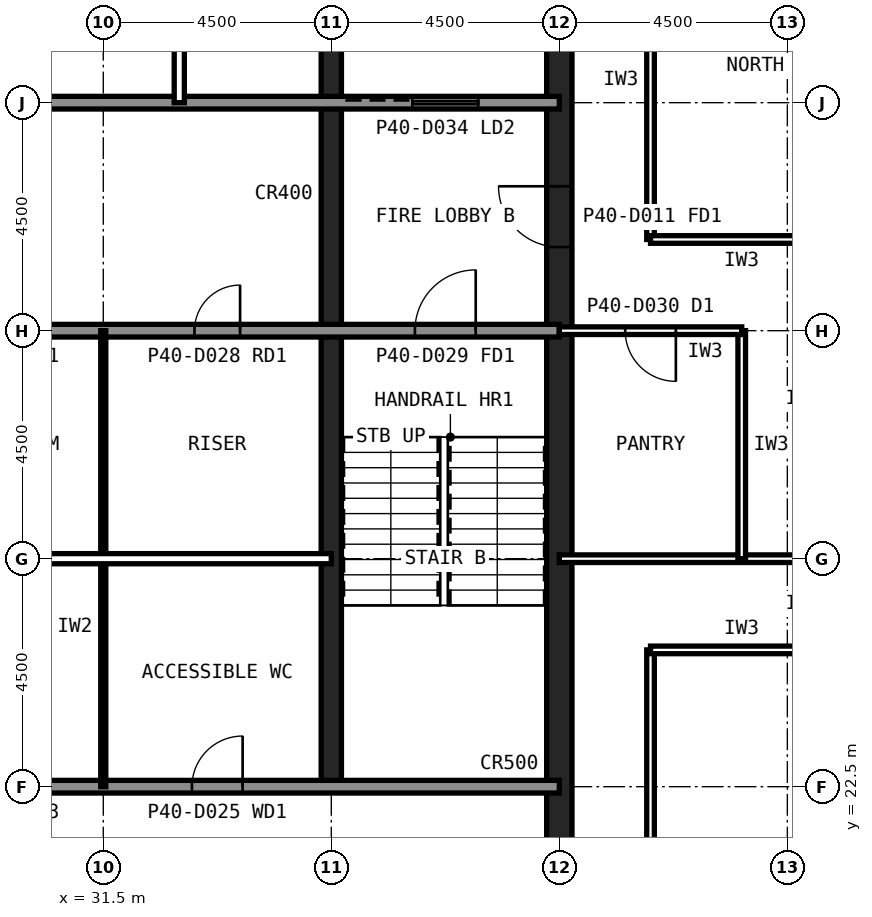
"""IFC4 building model, lengths in metres.
Left out: names, types, materials, properties, quantities, classifications, styles, units other than length and angle.
Written with IfcOpenShell. Run it as: python <this file> out.ifc"""

import sys

from ifc_helpers import new_model, si_unit, direction, frame, frame_2d, origin, place, context, subcontext, project, spatial, rectangle, extrude, element, fill, save


model = new_model("IFC4")
c1 = context("Model", 3, precision=1e-05, world=origin(), true_north=direction((0.0, 1.0)))
c2 = subcontext(c1, "Body", "Model", "MODEL_VIEW")
j1 = project(units=[si_unit("LENGTHUNIT", "METRE"), si_unit("PLANEANGLEUNIT", "RADIAN")], contexts=[c1])
p1 = place(None, origin())
s1 = spatial("IfcSite", under=j1, at=p1, CompositionType="ELEMENT")
p2 = place(p1, origin())
s2 = spatial("IfcBuilding", under=s1, at=p2, CompositionType="ELEMENT")
p3 = place(p2, frame((0.0, 0.0, 167.6)))
s3 = spatial("IfcBuildingStorey", under=s2, at=p3, CompositionType="ELEMENT", Elevation=167.6)
p4 = place(p3, frame((40.5, 13.5, 0.0), z_axis=(0.0, 0.0, 1.0), x_axis=(0.0, 1.0, 0.0)))
e1 = element("IfcWall", 1, at=p4, inside=s3, PredefinedType="SHEAR", context=c2, shape_type="SweptSolid", body=[
    extrude(rectangle(XDim=27.0, YDim=0.5, at=frame_2d((13.5, 0.0))), origin(), (0.0, 0.0, 1.0), 4.0),
])
p5 = place(p4, frame((5.85, 0.0, 0.0)))
e2 = element("IfcOpeningElement", 2, at=p5, cuts=e1, PredefinedType="OPENING", context=c2, shape_type="SweptSolid", body=[
    extrude(rectangle(XDim=1.8, YDim=2.1, at=frame_2d((0.9, 1.05))), frame((0.0, 0.26, 0.0), z_axis=(0.0, -1.0, 0.0), x_axis=(1.0, 0.0, 0.0)), (0.0, 0.0, 1.0), 0.52),
])
p6 = place(p4, frame((19.65, 0.0, 0.0)))
e3 = element("IfcOpeningElement", 3, at=p6, cuts=e1, PredefinedType="OPENING", context=c2, shape_type="SweptSolid", body=[
    extrude(rectangle(XDim=1.2, YDim=2.1, at=frame_2d((0.6, 1.05))), frame((0.0, 0.26, 0.0), z_axis=(0.0, -1.0, 0.0), x_axis=(1.0, 0.0, 0.0)), (0.0, 0.0, 1.0), 0.52),
])
p7 = place(p3, frame((36.0, 22.5, 0.0), z_axis=(0.0, 0.0, 1.0), x_axis=(0.0, 1.0, 0.0)))
e4 = element("IfcWall", 4, at=p7, inside=s3, PredefinedType="SHEAR", context=c2, shape_type="SweptSolid", body=[
    extrude(rectangle(XDim=18.0, YDim=0.4, at=frame_2d((9.0, 0.0))), origin(), (0.0, 0.0, 1.0), 4.0),
])
p8 = place(p3, frame((13.5, 36.0, 0.0), z_axis=(0.0, 0.0, 1.0), x_axis=(1.0, 0.0, 0.0)))
e5 = element("IfcWall", 5, at=p8, inside=s3, PredefinedType="SOLIDWALL", context=c2, shape_type="SweptSolid", body=[
    extrude(rectangle(XDim=27.0, YDim=0.25, at=frame_2d((13.5, 0.0))), origin(), (0.0, 0.0, 1.0), 3.84),
])
p9 = place(p8, frame((1.8, 0.0, 0.0)))
e6 = element("IfcOpeningElement", 6, at=p9, cuts=e5, PredefinedType="OPENING", context=c2, shape_type="SweptSolid", body=[
    extrude(rectangle(XDim=0.9, YDim=2.1, at=frame_2d((0.45, 1.05))), frame((0.0, 0.135, 0.0), z_axis=(0.0, -1.0, 0.0), x_axis=(1.0, 0.0, 0.0)), (0.0, 0.0, 1.0), 0.27),
])
p10 = place(p8, frame((5.55, 0.0, 0.0)))
e7 = element("IfcOpeningElement", 7, at=p10, cuts=e5, PredefinedType="OPENING", context=c2, shape_type="SweptSolid", body=[
    extrude(rectangle(XDim=0.9, YDim=2.1, at=frame_2d((0.45, 1.05))), frame((0.0, 0.135, 0.0), z_axis=(0.0, -1.0, 0.0), x_axis=(1.0, 0.0, 0.0)), (0.0, 0.0, 1.0), 0.27),
])
p11 = place(p8, frame((8.55, 0.0, 0.0)))
e8 = element("IfcOpeningElement", 8, at=p11, cuts=e5, PredefinedType="OPENING", context=c2, shape_type="SweptSolid", body=[
    extrude(rectangle(XDim=0.9, YDim=2.1, at=frame_2d((0.45, 1.05))), frame((0.0, 0.135, 0.0), z_axis=(0.0, -1.0, 0.0), x_axis=(1.0, 0.0, 0.0)), (0.0, 0.0, 1.0), 0.27),
])
p12 = place(p8, frame((24.1, 0.0, 0.0)))
e9 = element("IfcOpeningElement", 9, at=p12, cuts=e5, PredefinedType="OPENING", context=c2, shape_type="SweptSolid", body=[
    extrude(rectangle(XDim=1.3, YDim=2.2, at=frame_2d((0.65, 1.1))), frame((0.0, 0.135, 0.0), z_axis=(0.0, -1.0, 0.0), x_axis=(1.0, 0.0, 0.0)), (0.0, 0.0, 1.0), 0.27),
])
p13 = place(p3, frame((13.5, 22.5, 0.0), z_axis=(0.0, 0.0, 1.0), x_axis=(1.0, 0.0, 0.0)))
e10 = element("IfcWall", 10, at=p13, inside=s3, PredefinedType="SOLIDWALL", context=c2, shape_type="SweptSolid", body=[
    extrude(rectangle(XDim=27.0, YDim=0.25, at=frame_2d((13.5, 0.0))), origin(), (0.0, 0.0, 1.0), 3.84),
])
p14 = place(p13, frame((1.65, 0.0, 0.0)))
e11 = element("IfcOpeningElement", 11, at=p14, cuts=e10, PredefinedType="OPENING", context=c2, shape_type="SweptSolid", body=[
    extrude(rectangle(XDim=1.2, YDim=2.1, at=frame_2d((0.6, 1.05))), frame((0.0, 0.135, 0.0), z_axis=(0.0, -1.0, 0.0), x_axis=(1.0, 0.0, 0.0)), (0.0, 0.0, 1.0), 0.27),
])
p15 = place(p13, frame((6.025, 0.0, 0.0)))
e12 = element("IfcOpeningElement", 12, at=p15, cuts=e10, PredefinedType="OPENING", context=c2, shape_type="SweptSolid", body=[
    extrude(rectangle(XDim=1.0, YDim=2.1, at=frame_2d((0.5, 1.05))), frame((0.0, 0.135, 0.0), z_axis=(0.0, -1.0, 0.0), x_axis=(1.0, 0.0, 0.0)), (0.0, 0.0, 1.0), 0.27),
])
p16 = place(p13, frame((10.525, 0.0, 0.0)))
e13 = element("IfcOpeningElement", 13, at=p16, cuts=e10, PredefinedType="OPENING", context=c2, shape_type="SweptSolid", body=[
    extrude(rectangle(XDim=1.0, YDim=2.1, at=frame_2d((0.5, 1.05))), frame((0.0, 0.135, 0.0), z_axis=(0.0, -1.0, 0.0), x_axis=(1.0, 0.0, 0.0)), (0.0, 0.0, 1.0), 0.27),
])
p17 = place(p13, frame((19.75, 0.0, 0.0)))
e14 = element("IfcOpeningElement", 14, at=p17, cuts=e10, PredefinedType="OPENING", context=c2, shape_type="SweptSolid", body=[
    extrude(rectangle(XDim=1.0, YDim=2.1, at=frame_2d((0.5, 1.05))), frame((0.0, 0.135, 0.0), z_axis=(0.0, -1.0, 0.0), x_axis=(1.0, 0.0, 0.0)), (0.0, 0.0, 1.0), 0.27),
])
p18 = place(p13, frame((15.05, 0.0, 0.0)))
e15 = element("IfcOpeningElement", 15, at=p18, cuts=e10, PredefinedType="OPENING", context=c2, shape_type="SweptSolid", body=[
    extrude(rectangle(XDim=1.4, YDim=2.4, at=frame_2d((0.7, 1.2))), frame((0.0, 0.135, 0.0), z_axis=(0.0, -1.0, 0.0), x_axis=(1.0, 0.0, 0.0)), (0.0, 0.0, 1.0), 0.27),
])
p19 = place(p3, frame((13.5, 31.5, 0.0), z_axis=(0.0, 0.0, 1.0), x_axis=(1.0, 0.0, 0.0)))
e16 = element("IfcWall", 16, at=p19, inside=s3, PredefinedType="SOLIDWALL", context=c2, shape_type="SweptSolid", body=[
    extrude(rectangle(XDim=27.0, YDim=0.25, at=frame_2d((13.5, 0.0))), origin(), (0.0, 0.0, 1.0), 3.84),
])
p20 = place(p19, frame((24.15, 0.0, 0.0)))
e17 = element("IfcOpeningElement", 17, at=p20, cuts=e16, PredefinedType="OPENING", context=c2, shape_type="SweptSolid", body=[
    extrude(rectangle(XDim=1.2, YDim=2.1, at=frame_2d((0.6, 1.05))), frame((0.0, 0.135, 0.0), z_axis=(0.0, -1.0, 0.0), x_axis=(1.0, 0.0, 0.0)), (0.0, 0.0, 1.0), 0.27),
])
p21 = place(p19, frame((15.3, 0.0, 0.0)))
e18 = element("IfcOpeningElement", 18, at=p21, cuts=e16, PredefinedType="OPENING", context=c2, shape_type="SweptSolid", body=[
    extrude(rectangle(XDim=0.9, YDim=2.1, at=frame_2d((0.45, 1.05))), frame((0.0, 0.135, 0.0), z_axis=(0.0, -1.0, 0.0), x_axis=(1.0, 0.0, 0.0)), (0.0, 0.0, 1.0), 0.27),
])
p22 = place(p19, frame((19.8, 0.0, 0.0)))
e19 = element("IfcOpeningElement", 19, at=p22, cuts=e16, PredefinedType="OPENING", context=c2, shape_type="SweptSolid", body=[
    extrude(rectangle(XDim=0.9, YDim=2.1, at=frame_2d((0.45, 1.05))), frame((0.0, 0.135, 0.0), z_axis=(0.0, -1.0, 0.0), x_axis=(1.0, 0.0, 0.0)), (0.0, 0.0, 1.0), 0.27),
])
p23 = place(p3, frame((33.0, 36.0, 0.0), z_axis=(0.0, 0.0, 1.0), x_axis=(0.0, 1.0, 0.0)))
e20 = element("IfcWall", 20, at=p23, inside=s3, PredefinedType="PARTITIONING", context=c2, shape_type="SweptSolid", body=[
    extrude(rectangle(XDim=4.5, YDim=0.2, at=frame_2d((2.25, 0.0))), origin(), (0.0, 0.0, 1.0), 3.84),
])
p24 = place(p3, frame((31.5, 22.5, 0.0), z_axis=(0.0, 0.0, 1.0), x_axis=(0.0, 1.0, 0.0)))
e21 = element("IfcWall", 21, at=p24, inside=s3, PredefinedType="PLUMBINGWALL", context=c2, shape_type="SweptSolid", body=[
    extrude(rectangle(XDim=9.0, YDim=0.1, at=frame_2d((4.5, 0.0))), origin(), (0.0, 0.0, 1.0), 3.84),
])
p25 = place(p3, frame((27.0, 27.0, 0.0), z_axis=(0.0, 0.0, 1.0), x_axis=(1.0, 0.0, 0.0)))
e22 = element("IfcWall", 22, at=p25, inside=s3, PredefinedType="PARTITIONING", context=c2, shape_type="SweptSolid", body=[
    extrude(rectangle(XDim=9.0, YDim=0.2, at=frame_2d((4.5, 0.0))), origin(), (0.0, 0.0, 1.0), 3.84),
])
p26 = place(p3, frame((40.5, 27.0, 0.0), z_axis=(0.0, 0.0, 1.0), x_axis=(1.0, 0.0, 0.0)))
e23 = element("IfcWall", 23, at=p26, inside=s3, PredefinedType="PARTITIONING", context=c2, shape_type="SweptSolid", body=[
    extrude(rectangle(XDim=13.14, YDim=0.15, at=frame_2d((6.57, 0.0))), origin(), (0.0, 0.0, 1.0), 2.989),
])
p27 = place(p3, frame((42.3, 33.3, 0.0), z_axis=(0.0, 0.0, 1.0), x_axis=(0.0, 1.0, 0.0)))
e24 = element("IfcWall", 24, at=p27, inside=s3, PredefinedType="PARTITIONING", context=c2, shape_type="SweptSolid", body=[
    extrude(rectangle(XDim=9.0, YDim=0.15, at=frame_2d((4.5, 0.0))), origin(), (0.0, 0.0, 1.0), 3.84),
])
p28 = place(p27, frame((4.0, 0.0, 0.0)))
e25 = element("IfcOpeningElement", 25, at=p28, cuts=e24, PredefinedType="OPENING", context=c2, shape_type="SweptSolid", body=[
    extrude(rectangle(XDim=1.0, YDim=2.1, at=frame_2d((0.5, 1.05))), frame((0.0, 0.085, 0.0), z_axis=(0.0, -1.0, 0.0), x_axis=(1.0, 0.0, 0.0)), (0.0, 0.0, 1.0), 0.17),
])
p29 = place(p3, frame((45.9, 33.3, 0.0), z_axis=(0.0, 0.0, 1.0), x_axis=(-1.0, 0.0, 0.0)))
e26 = element("IfcWall", 26, at=p29, inside=s3, PredefinedType="PARTITIONING", context=c2, shape_type="SweptSolid", body=[
    extrude(rectangle(XDim=3.6, YDim=0.15, at=frame_2d((1.8, 0.0))), origin(), (0.0, 0.0, 1.0), 3.84),
])
p30 = place(p3, frame((42.3, 4.95, 0.0), z_axis=(0.0, 0.0, 1.0), x_axis=(0.0, 1.0, 0.0)))
e27 = element("IfcWall", 27, at=p30, inside=s3, PredefinedType="PARTITIONING", context=c2, shape_type="SweptSolid", body=[
    extrude(rectangle(XDim=20.25, YDim=0.15, at=frame_2d((10.125, 0.0))), origin(), (0.0, 0.0, 1.0), 3.84),
])
p31 = place(p30, frame((9.625, 0.0, 0.0)))
e28 = element("IfcOpeningElement", 28, at=p31, cuts=e27, PredefinedType="OPENING", context=c2, shape_type="SweptSolid", body=[
    extrude(rectangle(XDim=1.0, YDim=2.1, at=frame_2d((0.5, 1.05))), frame((0.0, 0.085, 0.0), z_axis=(0.0, -1.0, 0.0), x_axis=(1.0, 0.0, 0.0)), (0.0, 0.0, 1.0), 0.17),
])
p32 = place(p3, frame((42.3, 25.2, 0.0), z_axis=(0.0, 0.0, 1.0), x_axis=(1.0, 0.0, 0.0)))
e29 = element("IfcWall", 29, at=p32, inside=s3, PredefinedType="PARTITIONING", context=c2, shape_type="SweptSolid", body=[
    extrude(rectangle(XDim=3.6, YDim=0.15, at=frame_2d((1.8, 0.0))), origin(), (0.0, 0.0, 1.0), 3.84),
])
p33 = place(p3, frame((44.1, 27.0, 0.0), z_axis=(0.0, 0.0, 1.0), x_axis=(0.0, 1.0, 0.0)))
e30 = element("IfcWall", 30, at=p33, inside=s3, PredefinedType="PARTITIONING", context=c2, shape_type="SweptSolid", body=[
    extrude(rectangle(XDim=4.5, YDim=0.15, at=frame_2d((2.25, 0.0))), origin(), (0.0, 0.0, 1.0), 3.84),
])
p34 = place(p3, frame((44.1, 31.5, 0.0), z_axis=(0.0, 0.0, 1.0), x_axis=(-1.0, 0.0, 0.0)))
e31 = element("IfcWall", 31, at=p34, inside=s3, PredefinedType="PARTITIONING", context=c2, shape_type="SweptSolid", body=[
    extrude(rectangle(XDim=3.6, YDim=0.15, at=frame_2d((1.8, 0.0))), origin(), (0.0, 0.0, 1.0), 2.989),
])
p35 = place(p34, frame((1.3, 0.0, 0.0)))
e32 = element("IfcOpeningElement", 32, at=p35, cuts=e31, PredefinedType="OPENING", context=c2, shape_type="SweptSolid", body=[
    extrude(rectangle(XDim=1.0, YDim=2.1, at=frame_2d((0.5, 1.05))), frame((0.0, 0.085, 0.0), z_axis=(0.0, -1.0, 0.0), x_axis=(1.0, 0.0, 0.0)), (0.0, 0.0, 1.0), 0.17),
])
p36 = place(p6, origin())
e33 = element("IfcDoor", 33, at=p36, inside=s3, OperationType="SINGLE_SWING_RIGHT", PredefinedType="DOOR", context=c2, shape_type="SweptSolid", body=[
    extrude(rectangle(XDim=1.2, YDim=2.1, at=frame_2d((0.6, 1.05))), frame((0.0, 0.025, 0.0), z_axis=(0.0, -1.0, 0.0), x_axis=(1.0, 0.0, 0.0)), (0.0, 0.0, 1.0), 0.05),
])
fill(e3, e33)
p37 = place(p20, origin())
e34 = element("IfcDoor", 34, at=p37, inside=s3, OperationType="SINGLE_SWING_RIGHT", PredefinedType="DOOR", context=c2, shape_type="SweptSolid", body=[
    extrude(rectangle(XDim=1.2, YDim=2.1, at=frame_2d((0.6, 1.05))), frame((0.0, 0.025, 0.0), z_axis=(0.0, -1.0, 0.0), x_axis=(1.0, 0.0, 0.0)), (0.0, 0.0, 1.0), 0.05),
])
fill(e17, e34)
p38 = place(p17, origin())
e35 = element("IfcDoor", 35, at=p38, inside=s3, OperationType="SINGLE_SWING_RIGHT", PredefinedType="DOOR", context=c2, shape_type="SweptSolid", body=[
    extrude(rectangle(XDim=1.0, YDim=2.1, at=frame_2d((0.5, 1.05))), frame((0.0, 0.025, 0.0), z_axis=(0.0, -1.0, 0.0), x_axis=(1.0, 0.0, 0.0)), (0.0, 0.0, 1.0), 0.05),
])
fill(e14, e35)
p39 = place(p22, origin())
e36 = element("IfcDoor", 36, at=p39, inside=s3, OperationType="SINGLE_SWING_RIGHT", PredefinedType="DOOR", context=c2, shape_type="SweptSolid", body=[
    extrude(rectangle(XDim=0.9, YDim=2.1, at=frame_2d((0.45, 1.05))), frame((0.0, 0.025, 0.0), z_axis=(0.0, -1.0, 0.0), x_axis=(1.0, 0.0, 0.0)), (0.0, 0.0, 1.0), 0.05),
])
fill(e19, e36)
p40 = place(p12, origin())
e37 = element("IfcDoor", 37, at=p40, inside=s3, OperationType="SLIDING_TO_LEFT", PredefinedType="DOOR", context=c2, shape_type="SweptSolid", body=[
    extrude(rectangle(XDim=1.3, YDim=2.2, at=frame_2d((0.65, 1.1))), frame((0.0, 0.025, 0.0), z_axis=(0.0, -1.0, 0.0), x_axis=(1.0, 0.0, 0.0)), (0.0, 0.0, 1.0), 0.05),
])
fill(e9, e37)
p41 = place(p35, origin())
e38 = element("IfcDoor", 38, at=p41, inside=s3, OperationType="SINGLE_SWING_LEFT", PredefinedType="DOOR", context=c2, shape_type="SweptSolid", body=[
    extrude(rectangle(XDim=1.0, YDim=2.1, at=frame_2d((0.5, 1.05))), frame((0.0, 0.025, 0.0), z_axis=(0.0, -1.0, 0.0), x_axis=(1.0, 0.0, 0.0)), (0.0, 0.0, 1.0), 0.05),
])
fill(e32, e38)
save(model, sys.argv[1])
